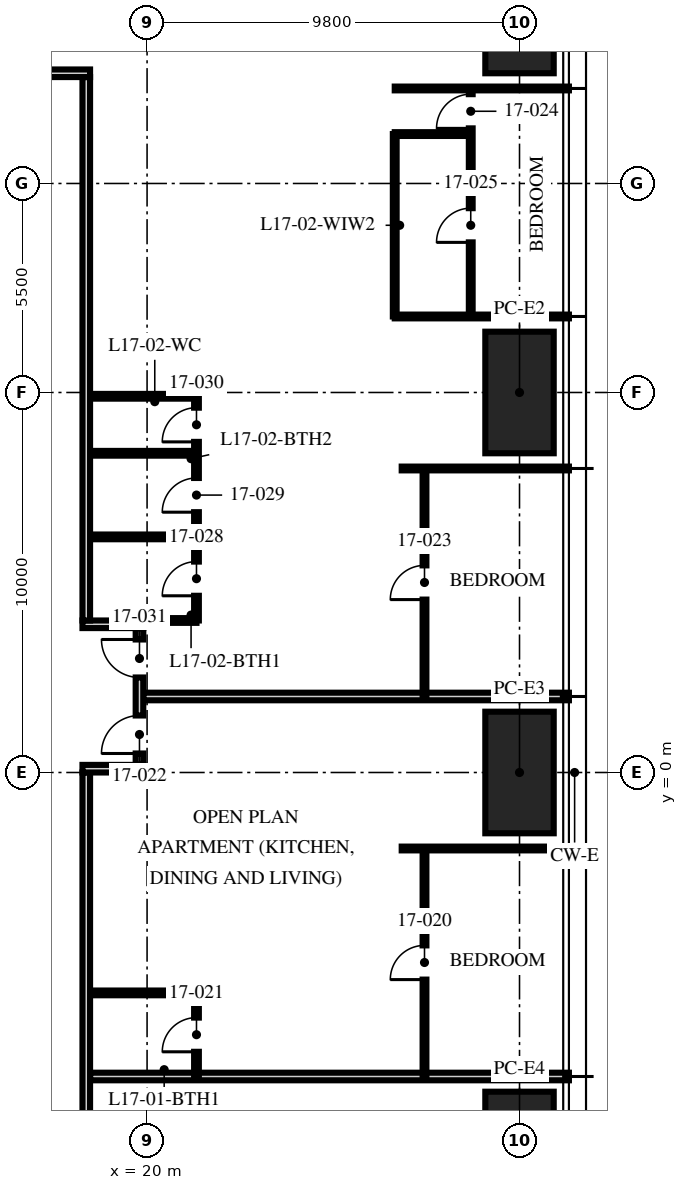
"""IFC4 building model, lengths in metres.
Left out: names, types, materials, properties, quantities, classifications, styles, units other than length and angle.
Written with IfcOpenShell. Run it as: python <this file> out.ifc"""

import sys

from ifc_helpers import new_model, si_unit, direction, frame, frame_2d, origin, origin_2d, place, context, subcontext, project, spatial, rectangle, hollow_rectangle, extrude, element, fill, save


model = new_model("IFC4")
c1 = context("Model", 3, precision=1e-05, world=origin(), true_north=direction((0.0, 1.0)))
c2 = subcontext(c1, "Body", "Model", "MODEL_VIEW")
j1 = project(units=[si_unit("LENGTHUNIT", "METRE"), si_unit("PLANEANGLEUNIT", "RADIAN")], contexts=[c1])
p1 = place(None, origin())
s1 = spatial("IfcSite", under=j1, at=p1, CompositionType="ELEMENT")
p2 = place(p1, origin())
s2 = spatial("IfcBuilding", under=s1, at=p2, CompositionType="ELEMENT")
p3 = place(p2, frame((0.0, 0.0, 69.75)))
s3 = spatial("IfcBuildingStorey", under=s2, at=p3, CompositionType="ELEMENT", Elevation=69.75)
for number, where, z_axis, x_axis in (
    (1, (29.8, 20.0, 0.0), (0.0, 0.0, 1.0), (0.0, 1.0, 0.0)),
    (2, (29.8, 10.0, 0.0), (0.0, 0.0, 1.0), (0.0, 1.0, 0.0)),
    (3, (29.8, 0.0, 0.0), (0.0, 0.0, 1.0), (0.0, 1.0, 0.0)),
    (4, (29.8, -10.0, 0.0), (0.0, 0.0, 1.0), (0.0, 1.0, 0.0)),
):
    element("IfcColumn", number, at=place(p3, frame(where, z_axis=z_axis, x_axis=x_axis)), inside=s3, PredefinedType="COLUMN", context=c2, shape_type="SweptSolid", body=[
        extrude(hollow_rectangle(XDim=3.2, YDim=1.8, WallThickness=0.2, at=origin_2d()), origin(), (0.0, 0.0, 1.0), 3.75),
    ])
p4 = place(p3, frame((18.5, -8.0, 0.0), z_axis=(0.0, 0.0, 1.0), x_axis=(1.0, 0.0, 0.0)))
e5 = element("IfcWall", 5, at=p4, inside=s3, PredefinedType="PARTITIONING", context=c2, shape_type="SweptSolid", body=[
    extrude(rectangle(XDim=12.6, YDim=0.2, at=frame_2d((6.3, 0.0))), origin(), (0.0, 0.0, 1.0), 2.71),
])
p5 = place(p3, frame((26.7, -2.0, 0.0), z_axis=(0.0, 0.0, 1.0), x_axis=(1.0, 0.0, 0.0)))
e6 = element("IfcWall", 6, at=p5, inside=s3, PredefinedType="PARTITIONING", context=c2, shape_type="SweptSolid", body=[
    extrude(rectangle(XDim=4.4, YDim=0.1, at=frame_2d((2.2, 0.0))), origin(), (0.0, 0.0, 1.0), 2.71),
])
p6 = place(p3, frame((19.9, 2.0, 0.0), z_axis=(0.0, 0.0, 1.0), x_axis=(1.0, 0.0, 0.0)))
e7 = element("IfcWall", 7, at=p6, inside=s3, PredefinedType="PARTITIONING", context=c2, shape_type="SweptSolid", body=[
    extrude(rectangle(XDim=11.2, YDim=0.2, at=frame_2d((5.6, 0.0))), origin(), (0.0, 0.0, 1.0), 2.71),
])
p7 = place(p3, frame((26.7, 8.0, 0.0), z_axis=(0.0, 0.0, 1.0), x_axis=(1.0, 0.0, 0.0)))
e8 = element("IfcWall", 8, at=p7, inside=s3, PredefinedType="PARTITIONING", context=c2, shape_type="SweptSolid", body=[
    extrude(rectangle(XDim=4.4, YDim=0.1, at=frame_2d((2.2, 0.0))), origin(), (0.0, 0.0, 1.0), 2.71),
])
for number, where, z_axis, x_axis in (
    (9, (26.517, 12.0, 0.0), (0.0, 0.0, 1.0), (1.0, 0.0, 0.0)),
    (10, (26.517, 18.0, 0.0), (0.0, 0.0, 1.0), (1.0, 0.0, 0.0)),
):
    element("IfcWall", number, at=place(p3, frame(where, z_axis=z_axis, x_axis=x_axis)), inside=s3, PredefinedType="PARTITIONING", context=c2, shape_type="SweptSolid", body=[
        extrude(rectangle(XDim=4.583, YDim=0.1, at=frame_2d((2.292, 0.0))), origin(), (0.0, 0.0, 1.0), 2.71),
    ])
p8 = place(p3, frame((27.3, -8.0, 0.0), z_axis=(0.0, 0.0, 1.0), x_axis=(0.0, 1.0, 0.0)))
e11 = element("IfcWall", 11, at=p8, inside=s3, PredefinedType="PARTITIONING", context=c2, shape_type="SweptSolid", body=[
    extrude(rectangle(XDim=6.0, YDim=0.1, at=frame_2d((3.0, 0.0))), origin(), (0.0, 0.0, 1.0), 2.61),
])
p9 = place(p8, frame((2.55, 0.0, 0.0)))
e12 = element("IfcOpeningElement", 12, at=p9, cuts=e11, PredefinedType="OPENING", context=c2, shape_type="SweptSolid", body=[
    extrude(rectangle(XDim=0.9, YDim=2.1, at=frame_2d((0.45, 1.05))), frame((0.0, 0.06, 0.0), z_axis=(0.0, -1.0, 0.0), x_axis=(1.0, 0.0, 0.0)), (0.0, 0.0, 1.0), 0.12),
])
p10 = place(p3, frame((21.3, -8.0, 0.0), z_axis=(0.0, 0.0, 1.0), x_axis=(0.0, 1.0, 0.0)))
e13 = element("IfcWall", 13, at=p10, inside=s3, PredefinedType="PARTITIONING", context=c2, shape_type="SweptSolid", body=[
    extrude(rectangle(XDim=2.2, YDim=0.125, at=frame_2d((1.1, 0.0))), origin(), (0.0, 0.0, 1.0), 3.5),
])
p11 = place(p10, frame((0.65, 0.0, 0.0)))
e14 = element("IfcOpeningElement", 14, at=p11, cuts=e13, PredefinedType="OPENING", context=c2, shape_type="SweptSolid", body=[
    extrude(rectangle(XDim=0.9, YDim=2.1, at=frame_2d((0.45, 1.05))), frame((0.0, 0.073, 0.0), z_axis=(0.0, -1.0, 0.0), x_axis=(1.0, 0.0, 0.0)), (0.0, 0.0, 1.0), 0.145),
])
p12 = place(p3, frame((18.5, -5.8, 0.0), z_axis=(0.0, 0.0, 1.0), x_axis=(1.0, 0.0, 0.0)))
e15 = element("IfcWall", 15, at=p12, inside=s3, PredefinedType="PARTITIONING", context=c2, shape_type="SweptSolid", body=[
    extrude(rectangle(XDim=2.8, YDim=0.125, at=frame_2d((1.4, 0.0))), origin(), (0.0, 0.0, 1.0), 3.5),
])
p13 = place(p3, frame((27.3, 2.0, 0.0), z_axis=(0.0, 0.0, 1.0), x_axis=(0.0, 1.0, 0.0)))
e16 = element("IfcWall", 16, at=p13, inside=s3, PredefinedType="PARTITIONING", context=c2, shape_type="SweptSolid", body=[
    extrude(rectangle(XDim=6.0, YDim=0.1, at=frame_2d((3.0, 0.0))), origin(), (0.0, 0.0, 1.0), 2.61),
])
p14 = place(p13, frame((2.55, 0.0, 0.0)))
e17 = element("IfcOpeningElement", 17, at=p14, cuts=e16, PredefinedType="OPENING", context=c2, shape_type="SweptSolid", body=[
    extrude(rectangle(XDim=0.9, YDim=2.1, at=frame_2d((0.45, 1.05))), frame((0.0, 0.06, 0.0), z_axis=(0.0, -1.0, 0.0), x_axis=(1.0, 0.0, 0.0)), (0.0, 0.0, 1.0), 0.12),
])
p15 = place(p3, frame((28.517, 12.0, 0.0), z_axis=(0.0, 0.0, 1.0), x_axis=(0.0, 1.0, 0.0)))
e18 = element("IfcWall", 18, at=p15, inside=s3, PredefinedType="PARTITIONING", context=c2, shape_type="SweptSolid", body=[
    extrude(rectangle(XDim=6.0, YDim=0.1, at=frame_2d((3.0, 0.0))), origin(), (0.0, 0.0, 1.0), 2.61),
])
p16 = place(p15, frame((4.95, 0.0, 0.0)))
e19 = element("IfcOpeningElement", 19, at=p16, cuts=e18, PredefinedType="OPENING", context=c2, shape_type="SweptSolid", body=[
    extrude(rectangle(XDim=0.9, YDim=2.1, at=frame_2d((0.45, 1.05))), frame((0.0, 0.06, 0.0), z_axis=(0.0, -1.0, 0.0), x_axis=(1.0, 0.0, 0.0)), (0.0, 0.0, 1.0), 0.12),
])
p17 = place(p15, frame((1.95, 0.0, 0.0)))
e20 = element("IfcOpeningElement", 20, at=p17, cuts=e18, PredefinedType="OPENING", context=c2, shape_type="SweptSolid", body=[
    extrude(rectangle(XDim=0.9, YDim=2.1, at=frame_2d((0.45, 1.05))), frame((0.0, 0.06, 0.0), z_axis=(0.0, -1.0, 0.0), x_axis=(1.0, 0.0, 0.0)), (0.0, 0.0, 1.0), 0.12),
])
p18 = place(p3, frame((26.517, 16.8, 0.0), z_axis=(0.0, 0.0, 1.0), x_axis=(1.0, 0.0, 0.0)))
e21 = element("IfcWall", 21, at=p18, inside=s3, PredefinedType="PARTITIONING", context=c2, shape_type="SweptSolid", body=[
    extrude(rectangle(XDim=2.0, YDim=0.1, at=frame_2d((1.0, 0.0))), origin(), (0.0, 0.0, 1.0), 3.5),
])
p19 = place(p3, frame((26.517, 12.0, 0.0), z_axis=(0.0, 0.0, 1.0), x_axis=(0.0, 1.0, 0.0)))
e22 = element("IfcWall", 22, at=p19, inside=s3, PredefinedType="PARTITIONING", context=c2, shape_type="SweptSolid", body=[
    extrude(rectangle(XDim=4.8, YDim=0.1, at=frame_2d((2.4, 0.0))), origin(), (0.0, 0.0, 1.0), 2.61),
])
p20 = place(p3, frame((21.3, 4.0, 0.0), z_axis=(0.0, 0.0, 1.0), x_axis=(0.0, 1.0, 0.0)))
e23 = element("IfcWall", 23, at=p20, inside=s3, PredefinedType="PARTITIONING", context=c2, shape_type="SweptSolid", body=[
    extrude(rectangle(XDim=5.9, YDim=0.125, at=frame_2d((2.95, 0.0))), origin(), (0.0, 0.0, 1.0), 2.492),
])
p21 = place(p20, frame((0.65, 0.0, 0.0)))
e24 = element("IfcOpeningElement", 24, at=p21, cuts=e23, PredefinedType="OPENING", context=c2, shape_type="SweptSolid", body=[
    extrude(rectangle(XDim=0.9, YDim=2.1, at=frame_2d((0.45, 1.05))), frame((0.0, 0.073, 0.0), z_axis=(0.0, -1.0, 0.0), x_axis=(1.0, 0.0, 0.0)), (0.0, 0.0, 1.0), 0.145),
])
p22 = place(p20, frame((2.85, 0.0, 0.0)))
e25 = element("IfcOpeningElement", 25, at=p22, cuts=e23, PredefinedType="OPENING", context=c2, shape_type="SweptSolid", body=[
    extrude(rectangle(XDim=0.9, YDim=2.1, at=frame_2d((0.45, 1.05))), frame((0.0, 0.073, 0.0), z_axis=(0.0, -1.0, 0.0), x_axis=(1.0, 0.0, 0.0)), (0.0, 0.0, 1.0), 0.145),
])
p23 = place(p20, frame((4.7, 0.0, 0.0)))
e26 = element("IfcOpeningElement", 26, at=p23, cuts=e23, PredefinedType="OPENING", context=c2, shape_type="SweptSolid", body=[
    extrude(rectangle(XDim=0.9, YDim=2.1, at=frame_2d((0.45, 1.05))), frame((0.0, 0.073, 0.0), z_axis=(0.0, -1.0, 0.0), x_axis=(1.0, 0.0, 0.0)), (0.0, 0.0, 1.0), 0.145),
])
p24 = place(p3, frame((19.97, 4.0, 0.0), z_axis=(0.0, 0.0, 1.0), x_axis=(1.0, 0.0, 0.0)))
e27 = element("IfcWall", 27, at=p24, inside=s3, PredefinedType="PARTITIONING", context=c2, shape_type="SweptSolid", body=[
    extrude(rectangle(XDim=1.33, YDim=0.125, at=frame_2d((0.665, 0.0))), origin(), (0.0, 0.0, 1.0), 3.5),
])
for number, where, z_axis, x_axis in (
    (28, (18.5, 6.2, 0.0), (0.0, 0.0, 1.0), (1.0, 0.0, 0.0)),
    (29, (18.5, 8.4, 0.0), (0.0, 0.0, 1.0), (1.0, 0.0, 0.0)),
):
    element("IfcWall", number, at=place(p3, frame(where, z_axis=z_axis, x_axis=x_axis)), inside=s3, PredefinedType="PARTITIONING", context=c2, shape_type="SweptSolid", body=[
        extrude(rectangle(XDim=2.8, YDim=0.125, at=frame_2d((1.4, 0.0))), origin(), (0.0, 0.0, 1.0), 3.5),
    ])
p25 = place(p3, frame((18.5, 9.9, 0.0), z_axis=(0.0, 0.0, 1.0), x_axis=(1.0, 0.0, 0.0)))
e30 = element("IfcWall", 30, at=p25, inside=s3, PredefinedType="PARTITIONING", context=c2, shape_type="SweptSolid", body=[
    extrude(rectangle(XDim=2.8, YDim=0.125, at=frame_2d((1.4, 0.0))), origin(), (0.0, 0.0, 1.0), 2.492),
])
p26 = place(p3, frame((18.4, -18.3, 0.0), z_axis=(0.0, 0.0, 1.0), x_axis=(0.0, 1.0, 0.0)))
e31 = element("IfcWall", 31, at=p26, inside=s3, PredefinedType="PARTITIONING", context=c2, shape_type="SweptSolid", body=[
    extrude(rectangle(XDim=18.3, YDim=0.2, at=frame_2d((9.15, 0.0))), origin(), (0.0, 0.0, 1.0), 2.3),
])
p27 = place(p3, frame((18.3, 0.1, 0.0), z_axis=(0.0, 0.0, 1.0), x_axis=(1.0, 0.0, 0.0)))
e32 = element("IfcWall", 32, at=p27, inside=s3, PredefinedType="PARTITIONING", context=c2, shape_type="SweptSolid", body=[
    extrude(rectangle(XDim=1.6, YDim=0.2, at=frame_2d((0.8, 0.0))), origin(), (0.0, 0.0, 1.0), 2.492),
])
p28 = place(p3, frame((18.3, 3.9, 0.0), z_axis=(0.0, 0.0, 1.0), x_axis=(1.0, 0.0, 0.0)))
e33 = element("IfcWall", 33, at=p28, inside=s3, PredefinedType="PARTITIONING", context=c2, shape_type="SweptSolid", body=[
    extrude(rectangle(XDim=1.6, YDim=0.2, at=frame_2d((0.8, 0.0))), origin(), (0.0, 0.0, 1.0), 3.5),
])
p29 = place(p3, frame((19.8, 0.2, 0.0), z_axis=(0.0, 0.0, 1.0), x_axis=(0.0, 1.0, 0.0)))
e34 = element("IfcWall", 34, at=p29, inside=s3, PredefinedType="PARTITIONING", context=c2, shape_type="SweptSolid", body=[
    extrude(rectangle(XDim=3.6, YDim=0.2, at=frame_2d((1.8, 0.0))), origin(), (0.0, 0.0, 1.0), 3.5),
])
p30 = place(p29, frame((0.3, 0.0, 0.0)))
e35 = element("IfcOpeningElement", 35, at=p30, cuts=e34, PredefinedType="OPENING", context=c2, shape_type="SweptSolid", body=[
    extrude(rectangle(XDim=1.0, YDim=2.2, at=frame_2d((0.5, 1.1))), frame((0.0, 0.11, 0.0), z_axis=(0.0, -1.0, 0.0), x_axis=(1.0, 0.0, 0.0)), (0.0, 0.0, 1.0), 0.22),
])
p31 = place(p29, frame((2.3, 0.0, 0.0)))
e36 = element("IfcOpeningElement", 36, at=p31, cuts=e34, PredefinedType="OPENING", context=c2, shape_type="SweptSolid", body=[
    extrude(rectangle(XDim=1.0, YDim=2.2, at=frame_2d((0.5, 1.1))), frame((0.0, 0.11, 0.0), z_axis=(0.0, -1.0, 0.0), x_axis=(1.0, 0.0, 0.0)), (0.0, 0.0, 1.0), 0.22),
])
p32 = place(p3, frame((18.4, 4.0, 0.0), z_axis=(0.0, 0.0, 1.0), x_axis=(0.0, 1.0, 0.0)))
e37 = element("IfcWall", 37, at=p32, inside=s3, PredefinedType="PARTITIONING", context=c2, shape_type="SweptSolid", body=[
    extrude(rectangle(XDim=14.3, YDim=0.2, at=frame_2d((7.15, 0.0))), origin(), (0.0, 0.0, 1.0), 2.3),
])
p33 = place(p3, frame((0.0, 18.4, 0.0), z_axis=(0.0, 0.0, 1.0), x_axis=(1.0, 0.0, 0.0)))
e38 = element("IfcWall", 38, at=p33, inside=s3, PredefinedType="PARTITIONING", context=c2, shape_type="SweptSolid", body=[
    extrude(rectangle(XDim=18.5, YDim=0.2, at=frame_2d((9.25, 0.0))), origin(), (0.0, 0.0, 1.0), 2.3),
])
p34 = place(p9, origin())
e39 = element("IfcDoor", 39, at=p34, inside=s3, OperationType="SINGLE_SWING_LEFT", PredefinedType="DOOR", context=c2, shape_type="SweptSolid", body=[
    extrude(rectangle(XDim=0.9, YDim=2.1, at=frame_2d((0.45, 1.05))), frame((0.0, 0.025, 0.0), z_axis=(0.0, -1.0, 0.0), x_axis=(1.0, 0.0, 0.0)), (0.0, 0.0, 1.0), 0.05),
])
fill(e12, e39)
p35 = place(p11, origin())
e40 = element("IfcDoor", 40, at=p35, inside=s3, OperationType="SINGLE_SWING_LEFT", PredefinedType="DOOR", context=c2, shape_type="SweptSolid", body=[
    extrude(rectangle(XDim=0.9, YDim=2.1, at=frame_2d((0.45, 1.05))), frame((0.0, 0.025, 0.0), z_axis=(0.0, -1.0, 0.0), x_axis=(1.0, 0.0, 0.0)), (0.0, 0.0, 1.0), 0.05),
])
fill(e14, e40)
p36 = place(p30, origin())
e41 = element("IfcDoor", 41, at=p36, inside=s3, OperationType="SINGLE_SWING_LEFT", PredefinedType="DOOR", context=c2, shape_type="SweptSolid", body=[
    extrude(rectangle(XDim=1.0, YDim=2.2, at=frame_2d((0.5, 1.1))), frame((0.0, 0.025, 0.0), z_axis=(0.0, -1.0, 0.0), x_axis=(1.0, 0.0, 0.0)), (0.0, 0.0, 1.0), 0.05),
])
fill(e35, e41)
p37 = place(p14, origin())
e42 = element("IfcDoor", 42, at=p37, inside=s3, OperationType="SINGLE_SWING_LEFT", PredefinedType="DOOR", context=c2, shape_type="SweptSolid", body=[
    extrude(rectangle(XDim=0.9, YDim=2.1, at=frame_2d((0.45, 1.05))), frame((0.0, 0.025, 0.0), z_axis=(0.0, -1.0, 0.0), x_axis=(1.0, 0.0, 0.0)), (0.0, 0.0, 1.0), 0.05),
])
fill(e17, e42)
p38 = place(p16, origin())
e43 = element("IfcDoor", 43, at=p38, inside=s3, OperationType="SINGLE_SWING_LEFT", PredefinedType="DOOR", context=c2, shape_type="SweptSolid", body=[
    extrude(rectangle(XDim=0.9, YDim=2.1, at=frame_2d((0.45, 1.05))), frame((0.0, 0.025, 0.0), z_axis=(0.0, -1.0, 0.0), x_axis=(1.0, 0.0, 0.0)), (0.0, 0.0, 1.0), 0.05),
])
fill(e19, e43)
p39 = place(p17, origin())
e44 = element("IfcDoor", 44, at=p39, inside=s3, OperationType="SINGLE_SWING_LEFT", PredefinedType="DOOR", context=c2, shape_type="SweptSolid", body=[
    extrude(rectangle(XDim=0.9, YDim=2.1, at=frame_2d((0.45, 1.05))), frame((0.0, 0.025, 0.0), z_axis=(0.0, -1.0, 0.0), x_axis=(1.0, 0.0, 0.0)), (0.0, 0.0, 1.0), 0.05),
])
fill(e20, e44)
p40 = place(p21, origin())
e45 = element("IfcDoor", 45, at=p40, inside=s3, OperationType="SINGLE_SWING_LEFT", PredefinedType="DOOR", context=c2, shape_type="SweptSolid", body=[
    extrude(rectangle(XDim=0.9, YDim=2.1, at=frame_2d((0.45, 1.05))), frame((0.0, 0.025, 0.0), z_axis=(0.0, -1.0, 0.0), x_axis=(1.0, 0.0, 0.0)), (0.0, 0.0, 1.0), 0.05),
])
fill(e24, e45)
p41 = place(p22, origin())
e46 = element("IfcDoor", 46, at=p41, inside=s3, OperationType="SINGLE_SWING_LEFT", PredefinedType="DOOR", context=c2, shape_type="SweptSolid", body=[
    extrude(rectangle(XDim=0.9, YDim=2.1, at=frame_2d((0.45, 1.05))), frame((0.0, 0.025, 0.0), z_axis=(0.0, -1.0, 0.0), x_axis=(1.0, 0.0, 0.0)), (0.0, 0.0, 1.0), 0.05),
])
fill(e25, e46)
p42 = place(p23, origin())
e47 = element("IfcDoor", 47, at=p42, inside=s3, OperationType="SINGLE_SWING_LEFT", PredefinedType="DOOR", context=c2, shape_type="SweptSolid", body=[
    extrude(rectangle(XDim=0.9, YDim=2.1, at=frame_2d((0.45, 1.05))), frame((0.0, 0.025, 0.0), z_axis=(0.0, -1.0, 0.0), x_axis=(1.0, 0.0, 0.0)), (0.0, 0.0, 1.0), 0.05),
])
fill(e26, e47)
p43 = place(p31, origin())
e48 = element("IfcDoor", 48, at=p43, inside=s3, OperationType="SINGLE_SWING_RIGHT", PredefinedType="DOOR", context=c2, shape_type="SweptSolid", body=[
    extrude(rectangle(XDim=1.0, YDim=2.2, at=frame_2d((0.5, 1.1))), frame((0.0, 0.025, 0.0), z_axis=(0.0, -1.0, 0.0), x_axis=(1.0, 0.0, 0.0)), (0.0, 0.0, 1.0), 0.05),
])
fill(e36, e48)
save(model, sys.argv[1])
